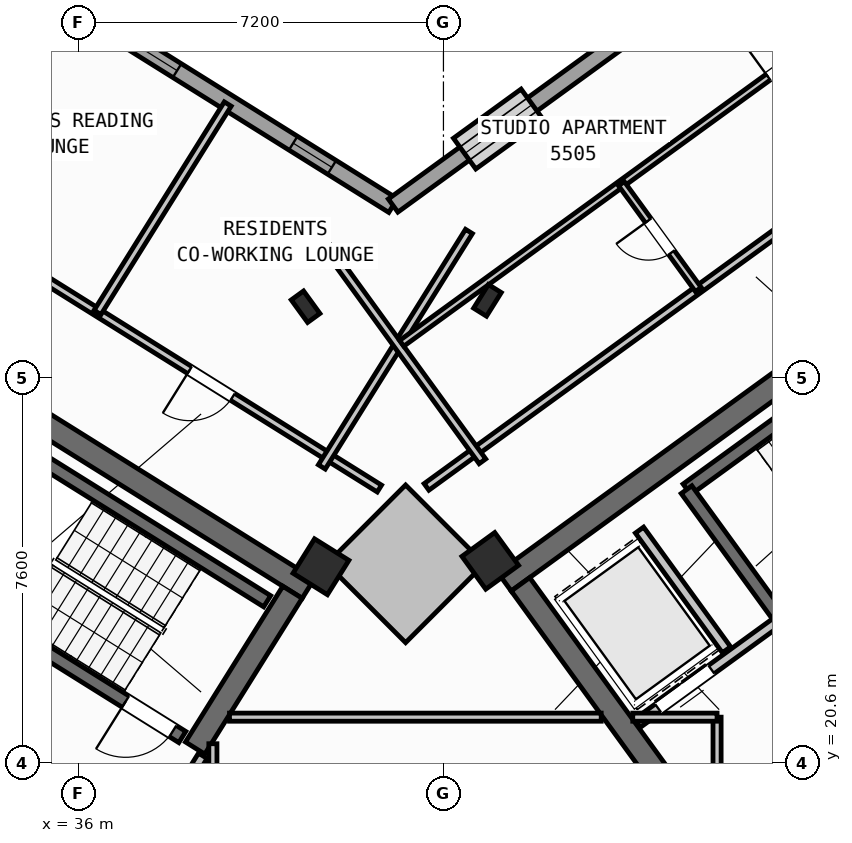
"""IFC4 building model, lengths in metres.
Left out: names, types, materials, properties, quantities, classifications, styles, units other than length and angle.
Written with IfcOpenShell. Run it as: python <this file> out.ifc"""

import sys

from ifc_helpers import new_model, si_unit, direction, frame, frame_2d, origin, origin_2d, place, context, subcontext, project, spatial, rectangle, hollow_rectangle, i_section, extrude, source, transform, mapped, element, fill, save


model = new_model("IFC4")
c1 = context("Model", 3, precision=1e-05, world=origin(), true_north=direction((0.0, 1.0)))
c2 = subcontext(c1, "Body", "Model", "MODEL_VIEW")
j1 = project(units=[si_unit("LENGTHUNIT", "METRE"), si_unit("PLANEANGLEUNIT", "RADIAN")], contexts=[c1])
p1 = place(None, origin())
s1 = spatial("IfcSite", under=j1, at=p1, CompositionType="ELEMENT")
p2 = place(p1, origin())
s2 = spatial("IfcBuilding", under=s1, at=p2, CompositionType="ELEMENT")
p3 = place(p2, frame((0.0, 0.0, 218.4)))
s3 = spatial("IfcBuildingStorey", under=s2, at=p3, CompositionType="ELEMENT", Elevation=218.4)
p4 = place(p3, frame((40.531, 24.036, 0.0), z_axis=(0.0, 0.0, 1.0), x_axis=(-0.848048787466, 0.529918157905, 0.0)))
e1 = element("IfcWall", 1, at=p4, inside=s3, PredefinedType="SHEAR", context=c2, shape_type="SweptSolid", body=[
    extrude(rectangle(XDim=13.04, YDim=0.45, at=frame_2d((6.52, 0.0))), origin(), (0.0, 0.0, 1.0), 3.35),
])
p5 = place(p3, frame((40.221, 23.965, 0.0), z_axis=(0.0, 0.0, 1.0), x_axis=(-0.529902075036, -0.848058836916, 0.0)))
e2 = element("IfcWall", 2, at=p5, inside=s3, PredefinedType="SHEAR", context=c2, shape_type="SweptSolid", body=[
    extrude(rectangle(XDim=3.625, YDim=0.45, at=frame_2d((1.812, 0.0))), origin(), (0.0, 0.0, 1.0), 3.35),
])
p6 = place(p3, frame((44.406, 24.172, 0.0), z_axis=(0.0, 0.0, 1.0), x_axis=(0.809012867805, 0.587790931986, 0.0)))
e3 = element("IfcWall", 3, at=p6, inside=s3, PredefinedType="SHEAR", context=c2, shape_type="SweptSolid", body=[
    extrude(rectangle(XDim=12.24, YDim=0.45, at=frame_2d((6.12, 0.0))), origin(), (0.0, 0.0, 1.0), 3.35),
])
p7 = place(p3, frame((48.526, 18.884, 0.0), z_axis=(0.0, 0.0, 1.0), x_axis=(-0.587774812919, 0.809024578921, 0.0)))
e4 = element("IfcWall", 4, at=p7, inside=s3, PredefinedType="SHEAR", context=c2, shape_type="SweptSolid", body=[
    extrude(rectangle(XDim=6.475, YDim=0.45, at=frame_2d((3.238, 0.0))), origin(), (0.0, 0.0, 1.0), 3.35),
])
m1 = source(origin(), c2, "Body", "SweptSolid", [
    extrude(i_section(OverallWidth=0.3, OverallDepth=0.55, WebThickness=0.015, FlangeThickness=0.029, at=origin_2d()), origin(), (0.0, 0.0, 1.0), 3.6),
])
p8 = place(p3, frame((44.068, 29.726, 0.0), z_axis=(0.0, 0.0, 1.0), x_axis=(-0.848048096156, 0.529919264233, 0.0)))
e5 = element("IfcColumn", 5, at=p8, inside=s3, PredefinedType="COLUMN", context=c2, shape_type="MappedRepresentation", body=[
    mapped(m1, transform((0.0, 0.0, 0.0), scale=1.0)),
])
m2 = source(origin(), c2, "Body", "SweptSolid", [
    extrude(hollow_rectangle(XDim=0.8, YDim=0.8, WallThickness=0.032, at=origin_2d()), origin(), (0.0, 0.0, 1.0), 3.6),
])
for number, where, z_axis, x_axis in (
    (6, (40.783, 24.469, 0.0), (0.0, 0.0, 1.0), (-0.848, 0.53, 0.0)),
    (7, (44.124, 24.585, 0.0), (0.0, 0.0, 1.0), (0.809, 0.588, 0.0)),
):
    element("IfcColumn", number, at=place(p3, frame(where, z_axis=z_axis, x_axis=x_axis)), inside=s3, PredefinedType="COLUMN", context=c2, shape_type="MappedRepresentation", body=[
        mapped(m2, transform((0.0, 0.0, 0.0), scale=1.0)),
    ])
p9 = place(p3, frame((40.479, 29.601, 0.0), z_axis=(0.0, 0.0, 1.0), x_axis=(0.809016994375, 0.587785252292, 0.0)))
e8 = element("IfcColumn", 8, at=p9, inside=s3, PredefinedType="COLUMN", context=c2, shape_type="MappedRepresentation", body=[
    mapped(m1, transform((0.0, 0.0, 0.0), scale=1.0)),
])
p10 = place(p3, frame((17.424, 47.083, 0.0), z_axis=(0.0, 0.0, 1.0), x_axis=(0.848049927979, -0.529916332693, 0.0)))
e9 = element("IfcWall", 9, at=p10, inside=s3, PredefinedType="STANDARD", context=c2, shape_type="SweptSolid", body=[
    extrude(rectangle(XDim=29.223, YDim=0.32, at=frame_2d((14.612, 0.0))), origin(), (0.0, 0.0, 1.0), 3.35),
])
p11 = place(p10, frame((3.77, 0.0, 0.0)))
e10 = element("IfcOpeningElement", 10, at=p11, cuts=e9, PredefinedType="OPENING", context=c2, shape_type="SweptSolid", body=[
    extrude(rectangle(XDim=1.05, YDim=2.15, at=frame_2d((0.525, 1.075))), frame((0.0, 0.17, 0.0), z_axis=(0.0, -1.0, 0.0), x_axis=(1.0, 0.0, 0.0)), (0.0, 0.0, 1.0), 0.34),
])
p12 = place(p10, frame((1.125, 0.0, 0.9)))
e11 = element("IfcOpeningElement", 11, at=p12, cuts=e9, PredefinedType="OPENING", context=c2, shape_type="SweptSolid", body=[
    extrude(rectangle(XDim=1.65, YDim=1.45, at=frame_2d((0.825, 0.725))), frame((0.0, 0.17, 0.0), z_axis=(0.0, -1.0, 0.0), x_axis=(1.0, 0.0, 0.0)), (0.0, 0.0, 1.0), 0.34),
])
p13 = place(p10, frame((7.384, 0.0, 0.9)))
e12 = element("IfcOpeningElement", 12, at=p13, cuts=e9, PredefinedType="OPENING", context=c2, shape_type="SweptSolid", body=[
    extrude(rectangle(XDim=1.35, YDim=1.45, at=frame_2d((0.675, 0.725))), frame((0.0, 0.17, 0.0), z_axis=(0.0, -1.0, 0.0), x_axis=(1.0, 0.0, 0.0)), (0.0, 0.0, 1.0), 0.34),
])
p14 = place(p10, frame((10.054, 0.0, 0.9)))
e13 = element("IfcOpeningElement", 13, at=p14, cuts=e9, PredefinedType="OPENING", context=c2, shape_type="SweptSolid", body=[
    extrude(rectangle(XDim=1.35, YDim=1.45, at=frame_2d((0.675, 0.725))), frame((0.0, 0.17, 0.0), z_axis=(0.0, -1.0, 0.0), x_axis=(1.0, 0.0, 0.0)), (0.0, 0.0, 1.0), 0.34),
])
p15 = place(p10, frame((14.039, 0.0, 1.0)))
e14 = element("IfcOpeningElement", 14, at=p15, cuts=e9, PredefinedType="OPENING", context=c2, shape_type="SweptSolid", body=[
    extrude(rectangle(XDim=0.9, YDim=1.25, at=frame_2d((0.45, 0.625))), frame((0.0, 0.17, 0.0), z_axis=(0.0, -1.0, 0.0), x_axis=(1.0, 0.0, 0.0)), (0.0, 0.0, 1.0), 0.34),
])
p16 = place(p10, frame((17.254, 0.0, 1.0)))
e15 = element("IfcOpeningElement", 15, at=p16, cuts=e9, PredefinedType="OPENING", context=c2, shape_type="SweptSolid", body=[
    extrude(rectangle(XDim=0.9, YDim=1.25, at=frame_2d((0.45, 0.625))), frame((0.0, 0.17, 0.0), z_axis=(0.0, -1.0, 0.0), x_axis=(1.0, 0.0, 0.0)), (0.0, 0.0, 1.0), 0.34),
])
p17 = place(p10, frame((20.161, 0.0, 0.9)))
e16 = element("IfcOpeningElement", 16, at=p17, cuts=e9, PredefinedType="OPENING", context=c2, shape_type="SweptSolid", body=[
    extrude(rectangle(XDim=1.35, YDim=1.45, at=frame_2d((0.675, 0.725))), frame((0.0, 0.17, 0.0), z_axis=(0.0, -1.0, 0.0), x_axis=(1.0, 0.0, 0.0)), (0.0, 0.0, 1.0), 0.34),
])
p18 = place(p10, frame((22.846, 0.0, 0.9)))
e17 = element("IfcOpeningElement", 17, at=p18, cuts=e9, PredefinedType="OPENING", context=c2, shape_type="SweptSolid", body=[
    extrude(rectangle(XDim=1.35, YDim=1.45, at=frame_2d((0.675, 0.725))), frame((0.0, 0.17, 0.0), z_axis=(0.0, -1.0, 0.0), x_axis=(1.0, 0.0, 0.0)), (0.0, 0.0, 1.0), 0.34),
])
p19 = place(p10, frame((26.898, 0.0, 1.0)))
e18 = element("IfcOpeningElement", 18, at=p19, cuts=e9, PredefinedType="OPENING", context=c2, shape_type="SweptSolid", body=[
    extrude(rectangle(XDim=0.9, YDim=1.25, at=frame_2d((0.45, 0.625))), frame((0.0, 0.17, 0.0), z_axis=(0.0, -1.0, 0.0), x_axis=(1.0, 0.0, 0.0)), (0.0, 0.0, 1.0), 0.34),
])
p20 = place(p3, frame((42.207, 31.597, 0.0), z_axis=(0.0, 0.0, 1.0), x_axis=(0.809020333377, 0.587780656523, 0.0)))
e19 = element("IfcWall", 19, at=p20, inside=s3, PredefinedType="STANDARD", context=c2, shape_type="SweptSolid", body=[
    extrude(rectangle(XDim=15.223, YDim=0.32, at=frame_2d((7.611, 0.0))), origin(), (0.0, 0.0, 1.0), 3.35),
])
p21 = place(p20, frame((12.82, 0.0, 0.0)))
e20 = element("IfcOpeningElement", 20, at=p21, cuts=e19, PredefinedType="OPENING", context=c2, shape_type="SweptSolid", body=[
    extrude(rectangle(XDim=1.05, YDim=2.15, at=frame_2d((0.525, 1.075))), frame((0.0, 0.17, 0.0), z_axis=(0.0, -1.0, 0.0), x_axis=(1.0, 0.0, 0.0)), (0.0, 0.0, 1.0), 0.34),
])
p22 = place(p20, frame((1.745, 0.0, 0.9)))
e21 = element("IfcOpeningElement", 21, at=p22, cuts=e19, PredefinedType="OPENING", context=c2, shape_type="SweptSolid", body=[
    extrude(rectangle(XDim=1.65, YDim=1.45, at=frame_2d((0.825, 0.725))), frame((0.0, 0.17, 0.0), z_axis=(0.0, -1.0, 0.0), x_axis=(1.0, 0.0, 0.0)), (0.0, 0.0, 1.0), 0.34),
])
p23 = place(p20, frame((5.985, 0.0, 0.9)))
e22 = element("IfcOpeningElement", 22, at=p23, cuts=e19, PredefinedType="OPENING", context=c2, shape_type="SweptSolid", body=[
    extrude(rectangle(XDim=1.65, YDim=1.45, at=frame_2d((0.825, 0.725))), frame((0.0, 0.17, 0.0), z_axis=(0.0, -1.0, 0.0), x_axis=(1.0, 0.0, 0.0)), (0.0, 0.0, 1.0), 0.34),
])
p24 = place(p20, frame((10.219, 0.0, 1.0)))
e23 = element("IfcOpeningElement", 23, at=p24, cuts=e19, PredefinedType="OPENING", context=c2, shape_type="SweptSolid", body=[
    extrude(rectangle(XDim=0.9, YDim=1.25, at=frame_2d((0.45, 0.625))), frame((0.0, 0.17, 0.0), z_axis=(0.0, -1.0, 0.0), x_axis=(1.0, 0.0, 0.0)), (0.0, 0.0, 1.0), 0.34),
])
p25 = place(p3, frame((39.721, 23.788, 0.0), z_axis=(0.0, 0.0, 1.0), x_axis=(-0.848054434086, 0.529909121291, 0.0)))
e24 = element("IfcWall", 24, at=p25, inside=s3, PredefinedType="SHEAR", context=c2, shape_type="SweptSolid", body=[
    extrude(rectangle(XDim=7.33, YDim=0.26, at=frame_2d((3.665, 0.0))), origin(), (0.0, 0.0, 1.0), 3.35),
])
p26 = place(p3, frame((38.046, 21.108, 0.0), z_axis=(0.0, 0.0, 1.0), x_axis=(-0.848054434086, 0.529909121291, 0.0)))
e25 = element("IfcWall", 25, at=p26, inside=s3, PredefinedType="SHEAR", context=c2, shape_type="SweptSolid", body=[
    extrude(rectangle(XDim=7.33, YDim=0.26, at=frame_2d((3.665, 0.0))), origin(), (0.0, 0.0, 1.0), 3.35),
])
p27 = place(p26, frame((0.22, 0.0, 0.0)))
e26 = element("IfcOpeningElement", 26, at=p27, cuts=e25, PredefinedType="OPENING", context=c2, shape_type="SweptSolid", body=[
    extrude(rectangle(XDim=1.1, YDim=2.1, at=frame_2d((0.55, 1.05))), frame((0.0, 0.14, 0.0), z_axis=(0.0, -1.0, 0.0), x_axis=(1.0, 0.0, 0.0)), (0.0, 0.0, 1.0), 0.28),
])
p28 = place(p3, frame((36.459, 18.421, 0.0), z_axis=(0.0, 0.0, 1.0), x_axis=(-0.848059591691, 0.529900867089, 0.0)))
e27 = element("IfcWall", 27, at=p28, inside=s3, PredefinedType="STANDARD", context=c2, shape_type="SweptSolid", body=[
    extrude(rectangle(XDim=5.818, YDim=0.2, at=frame_2d((2.909, 0.0))), origin(), (0.0, 0.0, 1.0), 3.34),
])
p29 = place(p28, frame((2.598, 0.0, 0.0)))
e28 = element("IfcOpeningElement", 28, at=p29, cuts=e27, PredefinedType="OPENING", context=c2, shape_type="SweptSolid", body=[
    extrude(rectangle(XDim=1.15, YDim=2.1, at=frame_2d((0.575, 1.05))), frame((0.0, 0.11, 0.0), z_axis=(0.0, -1.0, 0.0), x_axis=(1.0, 0.0, 0.0)), (0.0, 0.0, 1.0), 0.22),
])
p30 = place(p3, frame((48.006, 25.996, 0.0), z_axis=(0.0, 0.0, 1.0), x_axis=(0.80901903764, 0.587782439969, 0.0)))
e29 = element("IfcWall", 29, at=p30, inside=s3, PredefinedType="SHEAR", context=c2, shape_type="SweptSolid", body=[
    extrude(rectangle(XDim=7.46, YDim=0.26, at=frame_2d((3.73, 0.0))), origin(), (0.0, 0.0, 1.0), 3.35),
])
p31 = place(p3, frame((49.855, 23.434, 0.0), z_axis=(0.0, 0.0, 1.0), x_axis=(-0.58776738483, 0.809029975545, 0.0)))
e30 = element("IfcWall", 30, at=p31, inside=s3, PredefinedType="SHEAR", context=c2, shape_type="SweptSolid", body=[
    extrude(rectangle(XDim=3.16, YDim=0.26, at=frame_2d((1.58, 0.0))), origin(), (0.0, 0.0, 1.0), 3.35),
])
p32 = place(p3, frame((47.025, 21.378, 0.0), z_axis=(0.0, 0.0, 1.0), x_axis=(0.809052869724, 0.587735870941, 0.0)))
e31 = element("IfcWall", 31, at=p32, inside=s3, PredefinedType="STANDARD", context=c2, shape_type="SweptSolid", body=[
    extrude(rectangle(XDim=3.498, YDim=0.2, at=frame_2d((1.749, 0.0))), origin(), (0.0, 0.0, 1.0), 3.34),
])
p33 = place(p32, frame((0.508, 0.0, 0.0)))
e32 = element("IfcOpeningElement", 32, at=p33, cuts=e31, PredefinedType="OPENING", context=c2, shape_type="SweptSolid", body=[
    extrude(rectangle(XDim=1.3, YDim=2.2, at=frame_2d((0.65, 1.1))), frame((0.0, 0.11, 0.0), z_axis=(0.0, -1.0, 0.0), x_axis=(1.0, 0.0, 0.0)), (0.0, 0.0, 1.0), 0.22),
])
p34 = place(p3, frame((48.718, 19.048, 0.0), z_axis=(0.0, 0.0, 1.0), x_axis=(0.809017261719, 0.587784884325, 0.0)))
e33 = element("IfcWall", 33, at=p34, inside=s3, PredefinedType="STANDARD", context=c2, shape_type="SweptSolid", body=[
    extrude(rectangle(XDim=5.818, YDim=0.2, at=frame_2d((2.909, 0.0))), origin(), (0.0, 0.0, 1.0), 3.34),
])
p35 = place(p34, frame((2.598, 0.0, 0.0)))
e34 = element("IfcOpeningElement", 34, at=p35, cuts=e33, PredefinedType="OPENING", context=c2, shape_type="SweptSolid", body=[
    extrude(rectangle(XDim=1.15, YDim=2.1, at=frame_2d((0.575, 1.05))), frame((0.0, 0.11, 0.0), z_axis=(0.0, -1.0, 0.0), x_axis=(1.0, 0.0, 0.0)), (0.0, 0.0, 1.0), 0.22),
])
p36 = place(p3, frame((48.786, 22.83, 0.0), z_axis=(0.0, 0.0, 1.0), x_axis=(-0.587783856777, 0.809018008275, 0.0)))
e35 = element("IfcWall", 35, at=p36, inside=s3, PredefinedType="STANDARD", context=c2, shape_type="SweptSolid", body=[
    extrude(rectangle(XDim=2.92, YDim=0.2, at=frame_2d((1.46, 0.0))), origin(), (0.0, 0.0, 1.0), 3.34),
])
p37 = place(p3, frame((41.936, 26.012, 0.0), z_axis=(0.0, 0.0, 1.0), x_axis=(-0.848051154596, 0.529914369676, 0.0)))
e36 = element("IfcWall", 36, at=p37, inside=s3, PredefinedType="PARTITIONING", context=c2, shape_type="SweptSolid", body=[
    extrude(rectangle(XDim=15.57, YDim=0.16, at=frame_2d((7.785, 0.0))), origin(), (0.0, 0.0, 1.0), 3.34),
])
p38 = place(p37, frame((3.415, 0.0, 0.0)))
e37 = element("IfcOpeningElement", 37, at=p38, cuts=e36, PredefinedType="OPENING", context=c2, shape_type="SweptSolid", body=[
    extrude(rectangle(XDim=1.0, YDim=2.1, at=frame_2d((0.5, 1.05))), frame((0.0, 0.09, 0.0), z_axis=(0.0, -1.0, 0.0), x_axis=(1.0, 0.0, 0.0)), (0.0, 0.0, 1.0), 0.18),
])
p39 = place(p37, frame((10.565, 0.0, 0.0)))
e38 = element("IfcOpeningElement", 38, at=p39, cuts=e36, PredefinedType="OPENING", context=c2, shape_type="SweptSolid", body=[
    extrude(rectangle(XDim=1.0, YDim=2.1, at=frame_2d((0.5, 1.05))), frame((0.0, 0.09, 0.0), z_axis=(0.0, -1.0, 0.0), x_axis=(1.0, 0.0, 0.0)), (0.0, 0.0, 1.0), 0.18),
])
p40 = place(p3, frame((43.704, 31.086, 0.0), z_axis=(0.0, 0.0, 1.0), x_axis=(-0.529906828443, -0.848055866774, 0.0)))
e39 = element("IfcWall", 39, at=p40, inside=s3, PredefinedType="PARTITIONING", context=c2, shape_type="SweptSolid", body=[
    extrude(rectangle(XDim=5.48, YDim=0.16, at=frame_2d((2.74, 0.0))), origin(), (0.0, 0.0, 1.0), 3.34),
])
p41 = place(p3, frame((38.943, 33.601, 0.0), z_axis=(0.0, 0.0, 1.0), x_axis=(-0.529949167559, -0.848029409752, 0.0)))
e40 = element("IfcWall", 40, at=p41, inside=s3, PredefinedType="PARTITIONING", context=c2, shape_type="SweptSolid", body=[
    extrude(rectangle(XDim=4.85, YDim=0.16, at=frame_2d((2.425, 0.0))), origin(), (0.0, 0.0, 1.0), 3.34),
])
p42 = place(p3, frame((38.451, 20.737, 0.0), z_axis=(0.0, 0.0, 1.0), x_axis=(-0.529924799939, -0.848044637038, 0.0)))
e41 = element("IfcWall", 41, at=p42, inside=s3, PredefinedType="STANDARD", context=c2, shape_type="SweptSolid", body=[
    extrude(rectangle(XDim=2.96, YDim=0.2, at=frame_2d((1.48, 0.0))), origin(), (0.0, 0.0, 1.0), 3.34),
])
p43 = place(p42, frame((1.46, 0.0, 0.0)))
e42 = element("IfcOpeningElement", 42, at=p43, cuts=e41, PredefinedType="OPENING", context=c2, shape_type="SweptSolid", body=[
    extrude(rectangle(XDim=0.86, YDim=2.05, at=frame_2d((0.43, 1.025))), frame((0.0, 0.11, 0.0), z_axis=(0.0, -1.0, 0.0), x_axis=(1.0, 0.0, 0.0)), (0.0, 0.0, 1.0), 0.22),
])
p44 = place(p3, frame((38.65, 17.93, 0.0), z_axis=(0.0, 0.0, 1.0), x_axis=(0.0, 1.0, 0.0)))
e43 = element("IfcWall", 43, at=p44, inside=s3, PredefinedType="PARTITIONING", context=c2, shape_type="SweptSolid", body=[
    extrude(rectangle(XDim=3.046, YDim=0.16, at=frame_2d((1.523, 0.0))), origin(), (0.0, 0.0, 1.0), 3.34),
])
p45 = place(p3, frame((48.6, 19.21, 0.0), z_axis=(0.0, 0.0, 1.0), x_axis=(0.0, 1.0, 0.0)))
e44 = element("IfcWall", 44, at=p45, inside=s3, PredefinedType="PARTITIONING", context=c2, shape_type="SweptSolid", body=[
    extrude(rectangle(XDim=2.29, YDim=0.16, at=frame_2d((1.145, 0.0))), origin(), (0.0, 0.0, 1.0), 3.34),
])
p46 = place(p3, frame((38.978, 21.5, 0.0), z_axis=(0.0, 0.0, 1.0), x_axis=(1.0, 0.0, 0.0)))
e45 = element("IfcWall", 45, at=p46, inside=s3, PredefinedType="PARTITIONING", context=c2, shape_type="SweptSolid", body=[
    extrude(rectangle(XDim=7.336, YDim=0.16, at=frame_2d((3.668, 0.0))), origin(), (0.0, 0.0, 1.0), 3.34),
])
p47 = place(p3, frame((46.936, 21.5, 0.0), z_axis=(0.0, 0.0, 1.0), x_axis=(1.0, 0.0, 0.0)))
e46 = element("IfcWall", 46, at=p47, inside=s3, PredefinedType="PARTITIONING", context=c2, shape_type="SweptSolid", body=[
    extrude(rectangle(XDim=1.664, YDim=0.16, at=frame_2d((0.832, 0.0))), origin(), (0.0, 0.0, 1.0), 3.34),
])
p48 = place(p3, frame((42.866, 26.044, 0.0), z_axis=(0.0, 0.0, 1.0), x_axis=(0.809020254154, 0.587780765566, 0.0)))
e47 = element("IfcWall", 47, at=p48, inside=s3, PredefinedType="PARTITIONING", context=c2, shape_type="SweptSolid", body=[
    extrude(rectangle(XDim=14.67, YDim=0.16, at=frame_2d((7.335, 0.0))), origin(), (0.0, 0.0, 1.0), 3.34),
])
p49 = place(p48, frame((10.2, 0.0, 0.0)))
e48 = element("IfcOpeningElement", 48, at=p49, cuts=e47, PredefinedType="OPENING", context=c2, shape_type="SweptSolid", body=[
    extrude(rectangle(XDim=1.0, YDim=2.1, at=frame_2d((0.5, 1.05))), frame((0.0, 0.09, 0.0), z_axis=(0.0, -1.0, 0.0), x_axis=(1.0, 0.0, 0.0)), (0.0, 0.0, 1.0), 0.18),
])
p50 = place(p3, frame((43.969, 26.55, 0.0), z_axis=(0.0, 0.0, 1.0), x_axis=(-0.587776919386, 0.80902304852, 0.0)))
e49 = element("IfcWall", 49, at=p50, inside=s3, PredefinedType="PARTITIONING", context=c2, shape_type="SweptSolid", body=[
    extrude(rectangle(XDim=5.48, YDim=0.16, at=frame_2d((2.74, 0.0))), origin(), (0.0, 0.0, 1.0), 3.34),
])
p51 = place(p3, frame((42.377, 28.878, 0.0), z_axis=(0.0, 0.0, 1.0), x_axis=(0.809020411523, 0.587780548963, 0.0)))
e50 = element("IfcWall", 50, at=p51, inside=s3, PredefinedType="PLUMBINGWALL", context=c2, shape_type="SweptSolid", body=[
    extrude(rectangle(XDim=13.4, YDim=0.14, at=frame_2d((6.7, 0.0))), origin(), (0.0, 0.0, 1.0), 3.34),
])
p52 = place(p51, frame((8.94, 0.0, 0.0)))
e51 = element("IfcOpeningElement", 51, at=p52, cuts=e50, PredefinedType="OPENING", context=c2, shape_type="SweptSolid", body=[
    extrude(rectangle(XDim=0.92, YDim=2.08, at=frame_2d((0.46, 1.04))), frame((0.0, 0.08, 0.0), z_axis=(0.0, -1.0, 0.0), x_axis=(1.0, 0.0, 0.0)), (0.0, 0.0, 1.0), 0.16),
])
p53 = place(p3, frame((48.229, 29.941, 0.0), z_axis=(0.0, 0.0, 1.0), x_axis=(-0.587772116736, 0.809026537752, 0.0)))
e52 = element("IfcWall", 52, at=p53, inside=s3, PredefinedType="PLUMBINGWALL", context=c2, shape_type="SweptSolid", body=[
    extrude(rectangle(XDim=2.58, YDim=0.14, at=frame_2d((1.29, 0.0))), origin(), (0.0, 0.0, 1.0), 3.34),
])
p54 = place(p53, frame((0.9, 0.0, 0.0)))
e53 = element("IfcOpeningElement", 53, at=p54, cuts=e52, PredefinedType="OPENING", context=c2, shape_type="SweptSolid", body=[
    extrude(rectangle(XDim=0.78, YDim=2.05, at=frame_2d((0.39, 1.025))), frame((0.0, 0.08, 0.0), z_axis=(0.0, -1.0, 0.0), x_axis=(1.0, 0.0, 0.0)), (0.0, 0.0, 1.0), 0.16),
])
m3 = source(origin(), c2, "Body", "SweptSolid", [
    extrude(rectangle(XDim=1.35, YDim=1.45, at=frame_2d((0.675, 0.725))), frame((0.0, 0.03, 0.0), z_axis=(0.0, -1.0, 0.0), x_axis=(1.0, 0.0, 0.0)), (0.0, 0.0, 1.0), 0.06),
])
p55 = place(p18, origin())
e54 = element("IfcWindow", 54, at=p55, inside=s3, PartitioningType="SINGLE_PANEL", PredefinedType="WINDOW", context=c2, shape_type="MappedRepresentation", body=[
    mapped(m3, transform((0.0, 0.0, 0.0), scale=1.0)),
])
fill(e17, e54)
m4 = source(origin(), c2, "Body", "SweptSolid", [
    extrude(rectangle(XDim=0.9, YDim=1.25, at=frame_2d((0.45, 0.625))), frame((0.0, 0.03, 0.0), z_axis=(0.0, -1.0, 0.0), x_axis=(1.0, 0.0, 0.0)), (0.0, 0.0, 1.0), 0.06),
])
p56 = place(p19, origin())
e55 = element("IfcWindow", 55, at=p56, inside=s3, PartitioningType="SINGLE_PANEL", PredefinedType="WINDOW", context=c2, shape_type="MappedRepresentation", body=[
    mapped(m4, transform((0.0, 0.0, 0.0), scale=1.0)),
])
fill(e18, e55)
m5 = source(origin(), c2, "Body", "SweptSolid", [
    extrude(rectangle(XDim=1.65, YDim=1.45, at=frame_2d((0.825, 0.725))), frame((0.0, 0.03, 0.0), z_axis=(0.0, -1.0, 0.0), x_axis=(1.0, 0.0, 0.0)), (0.0, 0.0, 1.0), 0.06),
])
p57 = place(p22, origin())
e56 = element("IfcWindow", 56, at=p57, inside=s3, PartitioningType="SINGLE_PANEL", PredefinedType="WINDOW", context=c2, shape_type="MappedRepresentation", body=[
    mapped(m5, transform((0.0, 0.0, 0.0), scale=1.0)),
])
fill(e21, e56)
m6 = source(origin(), c2, "Body", "SweptSolid", [
    extrude(rectangle(XDim=1.1, YDim=2.1, at=frame_2d((0.55, 1.05))), frame((0.0, 0.025, 0.0), z_axis=(0.0, -1.0, 0.0), x_axis=(1.0, 0.0, 0.0)), (0.0, 0.0, 1.0), 0.05),
])
p58 = place(p27, origin())
e57 = element("IfcDoor", 57, at=p58, inside=s3, OperationType="SINGLE_SWING_RIGHT", PredefinedType="DOOR", context=c2, shape_type="MappedRepresentation", body=[
    mapped(m6, transform((0.0, 0.0, 0.0), scale=1.0)),
])
fill(e26, e57)
m7 = source(origin(), c2, "Body", "SweptSolid", [
    extrude(rectangle(XDim=1.3, YDim=2.2, at=frame_2d((0.65, 1.1))), frame((0.0, 0.025, 0.0), z_axis=(0.0, -1.0, 0.0), x_axis=(1.0, 0.0, 0.0)), (0.0, 0.0, 1.0), 0.05),
])
p59 = place(p33, origin())
e58 = element("IfcDoor", 58, at=p59, inside=s3, OperationType="DOUBLE_DOOR_SLIDING", PredefinedType="DOOR", context=c2, shape_type="MappedRepresentation", body=[
    mapped(m7, transform((0.0, 0.0, 0.0), scale=1.0)),
])
fill(e32, e58)
m8 = source(origin(), c2, "Body", "SweptSolid", [
    extrude(rectangle(XDim=1.0, YDim=2.1, at=frame_2d((0.5, 1.05))), frame((0.0, 0.025, 0.0), z_axis=(0.0, -1.0, 0.0), x_axis=(1.0, 0.0, 0.0)), (0.0, 0.0, 1.0), 0.05),
])
p60 = place(p38, origin())
e59 = element("IfcDoor", 59, at=p60, inside=s3, OperationType="SINGLE_SWING_RIGHT", PredefinedType="DOOR", context=c2, shape_type="MappedRepresentation", body=[
    mapped(m8, transform((0.0, 0.0, 0.0), scale=1.0)),
])
fill(e37, e59)
m9 = source(origin(), c2, "Body", "SweptSolid", [
    extrude(rectangle(XDim=0.92, YDim=2.08, at=frame_2d((0.46, 1.04))), frame((0.0, 0.025, 0.0), z_axis=(0.0, -1.0, 0.0), x_axis=(1.0, 0.0, 0.0)), (0.0, 0.0, 1.0), 0.05),
])
p61 = place(p52, origin())
e60 = element("IfcDoor", 60, at=p61, inside=s3, OperationType="SINGLE_SWING_LEFT", PredefinedType="DOOR", context=c2, shape_type="MappedRepresentation", body=[
    mapped(m9, transform((0.0, 0.0, 0.0), scale=1.0)),
])
fill(e51, e60)
m10 = source(origin(), c2, "Body", "SweptSolid", [
    extrude(rectangle(XDim=0.78, YDim=2.05, at=frame_2d((0.39, 1.025))), frame((0.0, 0.025, 0.0), z_axis=(0.0, -1.0, 0.0), x_axis=(1.0, 0.0, 0.0)), (0.0, 0.0, 1.0), 0.05),
])
p62 = place(p54, origin())
e61 = element("IfcDoor", 61, at=p62, inside=s3, OperationType="SINGLE_SWING_RIGHT", PredefinedType="DOOR", context=c2, shape_type="MappedRepresentation", body=[
    mapped(m10, transform((0.0, 0.0, 0.0), scale=1.0)),
])
fill(e53, e61)
save(model, sys.argv[1])
